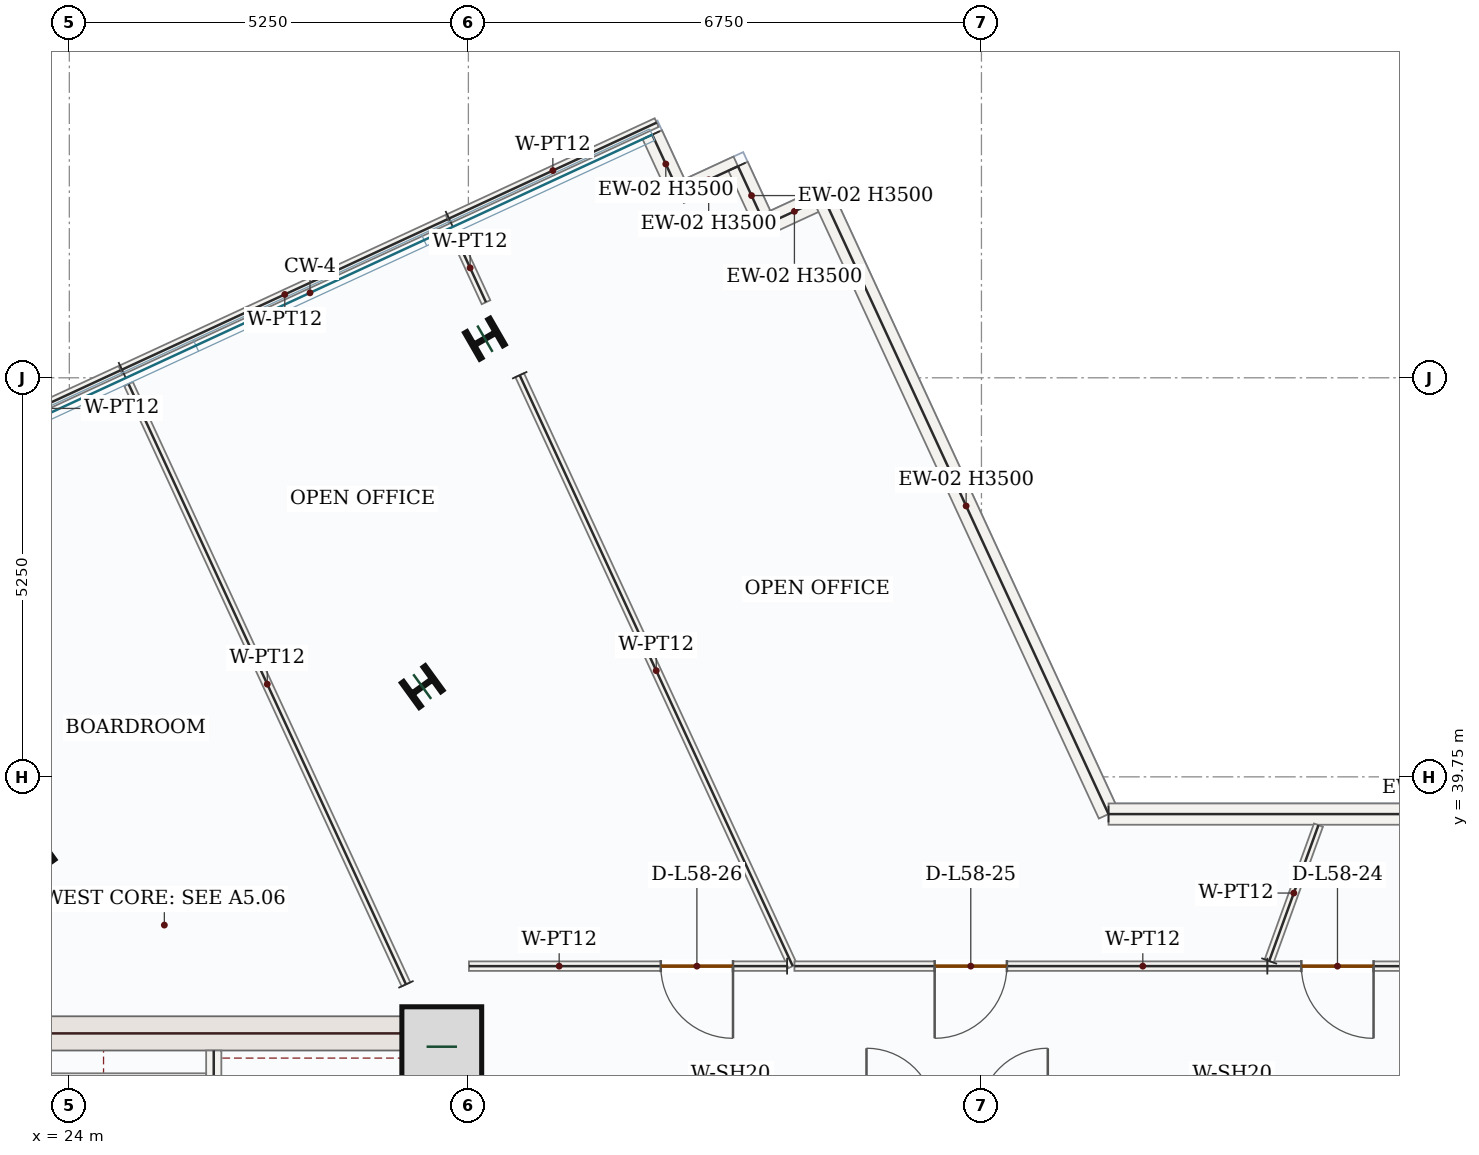
"""IFC4 building model, lengths in metres.
Left out: names, types, materials, properties, quantities, classifications, styles, units other than length and angle.
Written with IfcOpenShell. Run it as: python <this file> out.ifc"""

import sys

from ifc_helpers import new_model, si_unit, direction, frame, frame_2d, origin, origin_2d, place, context, subcontext, project, spatial, rectangle, i_section, extrude, source, transform, mapped, element, fill, save


model = new_model("IFC4")
c1 = context("Model", 3, precision=1e-05, world=origin(), true_north=direction((0.0, 1.0)))
c2 = subcontext(c1, "Body", "Model", "MODEL_VIEW")
j1 = project(units=[si_unit("LENGTHUNIT", "METRE"), si_unit("PLANEANGLEUNIT", "RADIAN")], contexts=[c1])
p1 = place(None, origin())
s1 = spatial("IfcSite", under=j1, at=p1, CompositionType="ELEMENT")
p2 = place(p1, origin())
s2 = spatial("IfcBuilding", under=s1, at=p2, CompositionType="ELEMENT")
p3 = place(p2, frame((0.0, 0.0, 246.6)))
s3 = spatial("IfcBuildingStorey", under=s2, at=p3, CompositionType="ELEMENT", Elevation=246.6)
p4 = place(p3, frame((29.025, 28.05, 0.0), z_axis=(0.0, 0.0, 1.0), x_axis=(0.0, 1.0, 0.0)))
e1 = element("IfcWall", 1, at=p4, inside=s3, PredefinedType="SHEAR", context=c2, shape_type="SweptSolid", body=[
    extrude(rectangle(XDim=8.55, YDim=0.45, at=frame_2d((4.275, 0.0))), origin(), (0.0, 0.0, 1.0), 3.5),
])
p5 = place(p4, frame((1.5, 0.0, 0.0)))
e2 = element("IfcOpeningElement", 2, at=p5, cuts=e1, PredefinedType="OPENING", context=c2, shape_type="SweptSolid", body=[
    extrude(rectangle(XDim=1.1, YDim=2.2, at=frame_2d((0.55, 1.1))), frame((0.0, 0.235, 0.0), z_axis=(0.0, -1.0, 0.0), x_axis=(1.0, 0.0, 0.0)), (0.0, 0.0, 1.0), 0.47),
])
m1 = source(origin(), c2, "Body", "SweptSolid", [
    extrude(rectangle(XDim=7.1, YDim=0.45, at=frame_2d((3.55, 0.0))), origin(), (0.0, 0.0, 1.0), 3.5),
])
p6 = place(p3, frame((21.7, 36.375, 0.0), z_axis=(0.0, 0.0, 1.0), x_axis=(1.0, 0.0, 0.0)))
e3 = element("IfcWall", 3, at=p6, inside=s3, PredefinedType="SHEAR", context=c2, shape_type="MappedRepresentation", body=[
    mapped(m1, transform((0.0, 0.0, 0.0), x_axis=(1.0, 0.0, 0.0), y_axis=(0.0, 1.0, 0.0), z_axis=(0.0, 0.0, 1.0), scale=1.0)),
])
m2 = source(origin(), c2, "Body", "SweptSolid", [
    extrude(rectangle(XDim=1.05, YDim=1.05, at=origin_2d()), origin(), (0.0, 0.0, 1.0), 3.75),
])
p7 = place(p3, frame((28.9, 36.2, 0.0), z_axis=(0.0, 0.0, 1.0), x_axis=(1.0, 0.0, 0.0)))
e4 = element("IfcColumn", 4, at=p7, inside=s3, PredefinedType="COLUMN", context=c2, shape_type="MappedRepresentation", body=[
    mapped(m2, transform((0.0, 0.0, 0.0), x_axis=(1.0, 0.0, 0.0), y_axis=(0.0, 1.0, 0.0), z_axis=(0.0, 0.0, 1.0), scale=1.0)),
])
m3 = source(origin(), c2, "Body", "SweptSolid", [
    extrude(i_section(OverallWidth=0.399, OverallDepth=0.386, WebThickness=0.021, FlangeThickness=0.033, FilletRadius=0.018, at=origin_2d()), origin(), (0.0, 0.0, 1.0), 3.75),
])
for number, where, z_axis, x_axis in (
    (5, (28.643, 40.937, 0.0), (0.0, 0.0, 1.0), (-0.588, 0.809, 0.0)),
    (6, (23.536, 38.711, 0.0), (0.0, 0.0, 1.0), (-0.588, 0.809, 0.0)),
    (7, (29.468, 45.514, 0.0), (0.0, 0.0, 1.0), (-0.5, 0.866, 0.0)),
):
    element("IfcColumn", number, at=place(p3, frame(where, z_axis=z_axis, x_axis=x_axis)), inside=s3, PredefinedType="COLUMN", context=c2, shape_type="MappedRepresentation", body=[
        mapped(m3, transform((0.0, 0.0, 0.0), x_axis=(1.0, 0.0, 0.0), y_axis=(0.0, 1.0, 0.0), z_axis=(0.0, 0.0, 1.0), scale=1.0)),
    ])
m4 = source(origin(), c2, "Body", "SweptSolid", [
    extrude(rectangle(XDim=0.85, YDim=0.28, at=frame_2d((0.425, 0.0))), origin(), (0.0, 0.0, 1.0), 3.5),
])
p8 = place(p3, frame((31.669, 48.198, 0.0), z_axis=(0.0, 0.0, 1.0), x_axis=(0.419422493365, -0.907791150023, 0.0)))
e8 = element("IfcWall", 8, at=p8, inside=s3, PredefinedType="SOLIDWALL", context=c2, shape_type="MappedRepresentation", body=[
    mapped(m4, transform((0.0, 0.0, 0.0), x_axis=(1.0, 0.0, 0.0), y_axis=(0.0, 1.0, 0.0), z_axis=(0.0, 0.0, 1.0), scale=1.0)),
])
m5 = source(origin(), c2, "Body", "SweptSolid", [
    extrude(rectangle(XDim=0.85, YDim=0.28, at=frame_2d((0.425, 0.0))), origin(), (0.0, 0.0, 1.0), 3.5),
])
p9 = place(p3, frame((32.025, 47.427, 0.0), z_axis=(0.0, 0.0, 1.0), x_axis=(0.907841666427, 0.419313139191, 0.0)))
e9 = element("IfcWall", 9, at=p9, inside=s3, PredefinedType="SOLIDWALL", context=c2, shape_type="MappedRepresentation", body=[
    mapped(m5, transform((0.0, 0.0, 0.0), x_axis=(1.0, 0.0, 0.0), y_axis=(0.0, 1.0, 0.0), z_axis=(0.0, 0.0, 1.0), scale=1.0)),
])
p10 = place(p3, frame((32.797, 47.783, 0.0), z_axis=(0.0, 0.0, 1.0), x_axis=(0.419422493365, -0.907791150023, 0.0)))
e10 = element("IfcWall", 10, at=p10, inside=s3, PredefinedType="SOLIDWALL", context=c2, shape_type="MappedRepresentation", body=[
    mapped(m4, transform((0.0, 0.0, 0.0), x_axis=(1.0, 0.0, 0.0), y_axis=(0.0, 1.0, 0.0), z_axis=(0.0, 0.0, 1.0), scale=1.0)),
])
p11 = place(p3, frame((33.154, 47.012, 0.0), z_axis=(0.0, 0.0, 1.0), x_axis=(0.907841666427, 0.419313139191, 0.0)))
e11 = element("IfcWall", 11, at=p11, inside=s3, PredefinedType="SOLIDWALL", context=c2, shape_type="MappedRepresentation", body=[
    mapped(m5, transform((0.0, 0.0, 0.0), x_axis=(1.0, 0.0, 0.0), y_axis=(0.0, 1.0, 0.0), z_axis=(0.0, 0.0, 1.0), scale=1.0)),
])
m6 = source(origin(), c2, "Body", "SweptSolid", [
    extrude(rectangle(XDim=8.932, YDim=0.28, at=frame_2d((4.466, 0.0))), origin(), (0.0, 0.0, 1.0), 3.5),
])
p12 = place(p3, frame((33.925, 47.368, 0.0), z_axis=(0.0, 0.0, 1.0), x_axis=(0.419437747849, -0.90778410191, 0.0)))
e12 = element("IfcWall", 12, at=p12, inside=s3, PredefinedType="SOLIDWALL", context=c2, shape_type="MappedRepresentation", body=[
    mapped(m6, transform((0.0, 0.0, 0.0), x_axis=(1.0, 0.0, 0.0), y_axis=(0.0, 1.0, 0.0), z_axis=(0.0, 0.0, 1.0), scale=1.0)),
])
m7 = source(origin(), c2, "Body", "SweptSolid", [
    extrude(rectangle(XDim=8.984, YDim=0.28, at=frame_2d((4.492, 0.0))), origin(), (0.0, 0.0, 1.0), 2.772),
])
p13 = place(p3, frame((37.672, 39.26, 0.0), z_axis=(0.0, 0.0, 1.0), x_axis=(1.0, 0.0, 0.0)))
e13 = element("IfcWall", 13, at=p13, inside=s3, PredefinedType="SOLIDWALL", context=c2, shape_type="MappedRepresentation", body=[
    mapped(m7, transform((0.0, 0.0, 0.0), x_axis=(1.0, 0.0, 0.0), y_axis=(0.0, 1.0, 0.0), z_axis=(0.0, 0.0, 1.0), scale=1.0)),
])
p14 = place(p3, frame((25.9, 28.15, 0.0), z_axis=(0.0, 0.0, 1.0), x_axis=(0.0, 1.0, 0.0)))
e14 = element("IfcWall", 14, at=p14, inside=s3, PredefinedType="SOLIDWALL", context=c2, shape_type="SweptSolid", body=[
    extrude(rectangle(XDim=8.0, YDim=0.2, at=frame_2d((4.0, 0.0))), origin(), (0.0, 0.0, 1.0), 3.5),
])
p15 = place(p14, frame((0.4, 0.0, 0.0)))
e15 = element("IfcOpeningElement", 15, at=p15, cuts=e14, PredefinedType="OPENING", context=c2, shape_type="SweptSolid", body=[
    extrude(rectangle(XDim=1.05, YDim=2.15, at=frame_2d((0.525, 1.075))), frame((0.0, 0.11, 0.0), z_axis=(0.0, -1.0, 0.0), x_axis=(1.0, 0.0, 0.0)), (0.0, 0.0, 1.0), 0.22),
])
m8 = source(origin(), c2, "Body", "SweptSolid", [
    extrude(rectangle(XDim=3.25, YDim=0.2, at=frame_2d((1.625, 0.0))), origin(), (0.0, 0.0, 1.0), 3.5),
])
p16 = place(p3, frame((22.55, 35.75, 0.0), z_axis=(0.0, 0.0, 1.0), x_axis=(1.0, 0.0, 0.0)))
e16 = element("IfcWall", 16, at=p16, inside=s3, PredefinedType="SOLIDWALL", context=c2, shape_type="MappedRepresentation", body=[
    mapped(m8, transform((0.0, 0.0, 0.0), x_axis=(1.0, 0.0, 0.0), y_axis=(0.0, 1.0, 0.0), z_axis=(0.0, 0.0, 1.0), scale=1.0)),
])
p17 = place(p3, frame((42.747, 37.259, 0.0), z_axis=(0.0, 0.0, 1.0), x_axis=(-0.999999916415, 0.000408864141, 0.0)))
e17 = element("IfcWall", 17, at=p17, inside=s3, PredefinedType="PARTITIONING", context=c2, shape_type="SweptSolid", body=[
    extrude(rectangle(XDim=2.986, YDim=0.125, at=frame_2d((1.493, 0.0))), origin(), (0.0, 0.0, 1.0), 3.5),
])
p18 = place(p17, frame((1.588, 0.0, 0.0)))
e18 = element("IfcOpeningElement", 18, at=p18, cuts=e17, PredefinedType="OPENING", context=c2, shape_type="SweptSolid", body=[
    extrude(rectangle(XDim=0.95, YDim=2.15, at=frame_2d((0.475, 1.075))), frame((0.0, 0.073, 0.0), z_axis=(0.0, -1.0, 0.0), x_axis=(1.0, 0.0, 0.0)), (0.0, 0.0, 1.0), 0.145),
])
m9 = source(origin(), c2, "Body", "SweptSolid", [
    extrude(rectangle(XDim=1.901, YDim=0.125, at=frame_2d((0.951, 0.0))), origin(), (0.0, 0.0, 1.0), 3.5),
])
p19 = place(p3, frame((39.785, 37.327, 0.0), z_axis=(0.0, 0.0, 1.0), x_axis=(0.340887270823, 0.940104179648, 0.0)))
e19 = element("IfcWall", 19, at=p19, inside=s3, PredefinedType="PARTITIONING", context=c2, shape_type="MappedRepresentation", body=[
    mapped(m9, transform((0.0, 0.0, 0.0), x_axis=(1.0, 0.0, 0.0), y_axis=(0.0, 1.0, 0.0), z_axis=(0.0, 0.0, 1.0), scale=1.0)),
])
m10 = source(origin(), c2, "Body", "SweptSolid", [
    extrude(rectangle(XDim=8.564, YDim=0.125, at=frame_2d((4.282, 0.0))), origin(), (0.0, 0.0, 1.0), 3.5),
])
p20 = place(p3, frame((29.925, 45.034, 0.0), z_axis=(0.0, 0.0, 1.0), x_axis=(0.419463084945, -0.907772394584, 0.0)))
e20 = element("IfcWall", 20, at=p20, inside=s3, PredefinedType="PARTITIONING", context=c2, shape_type="MappedRepresentation", body=[
    mapped(m10, transform((0.0, 0.0, 0.0), x_axis=(1.0, 0.0, 0.0), y_axis=(0.0, 1.0, 0.0), z_axis=(0.0, 0.0, 1.0), scale=1.0)),
])
p21 = place(p3, frame((33.443, 37.26, 0.0), z_axis=(0.0, 0.0, 1.0), x_axis=(-0.999999998299, -5.8329445e-05, 0.0)))
e21 = element("IfcWall", 21, at=p21, inside=s3, PredefinedType="PARTITIONING", context=c2, shape_type="SweptSolid", body=[
    extrude(rectangle(XDim=4.186, YDim=0.125, at=frame_2d((2.093, 0.0))), origin(), (0.0, 0.0, 1.0), 3.5),
])
p22 = place(p21, frame((0.712, 0.0, 0.0)))
e22 = element("IfcOpeningElement", 22, at=p22, cuts=e21, PredefinedType="OPENING", context=c2, shape_type="SweptSolid", body=[
    extrude(rectangle(XDim=0.95, YDim=2.15, at=frame_2d((0.475, 1.075))), frame((0.0, 0.073, 0.0), z_axis=(0.0, -1.0, 0.0), x_axis=(1.0, 0.0, 0.0)), (0.0, 0.0, 1.0), 0.145),
])
m11 = source(origin(), c2, "Body", "SweptSolid", [
    extrude(rectangle(XDim=8.701, YDim=0.125, at=frame_2d((4.351, 0.0))), origin(), (0.0, 0.0, 1.0), 3.5),
])
p23 = place(p3, frame((28.429, 37.02, 0.0), z_axis=(0.0, 0.0, 1.0), x_axis=(-0.419458495046, 0.907774515468, 0.0)))
e23 = element("IfcWall", 23, at=p23, inside=s3, PredefinedType="PARTITIONING", context=c2, shape_type="MappedRepresentation", body=[
    mapped(m11, transform((0.0, 0.0, 0.0), x_axis=(1.0, 0.0, 0.0), y_axis=(0.0, 1.0, 0.0), z_axis=(0.0, 0.0, 1.0), scale=1.0)),
])
m12 = source(origin(), c2, "Body", "SweptSolid", [
    extrude(rectangle(XDim=4.72, YDim=0.125, at=frame_2d((2.36, 0.0))), origin(), (0.0, 0.0, 1.0), 3.5),
])
p24 = place(p3, frame((24.692, 45.107, 0.0), z_axis=(0.0, 0.0, 1.0), x_axis=(0.907753377062, 0.419504238873, 0.0)))
e24 = element("IfcWall", 24, at=p24, inside=s3, PredefinedType="PARTITIONING", context=c2, shape_type="MappedRepresentation", body=[
    mapped(m12, transform((0.0, 0.0, 0.0), x_axis=(1.0, 0.0, 0.0), y_axis=(0.0, 1.0, 0.0), z_axis=(0.0, 0.0, 1.0), scale=1.0)),
])
m13 = source(origin(), c2, "Body", "SweptSolid", [
    extrude(rectangle(XDim=0.996, YDim=0.125, at=frame_2d((0.498, 0.0))), origin(), (0.0, 0.0, 1.0), 3.5),
])
p25 = place(p3, frame((29.064, 46.898, 0.0), z_axis=(0.0, 0.0, 1.0), x_axis=(0.419540149112, -0.907736780836, 0.0)))
e25 = element("IfcWall", 25, at=p25, inside=s3, PredefinedType="PARTITIONING", context=c2, shape_type="MappedRepresentation", body=[
    mapped(m13, transform((0.0, 0.0, 0.0), x_axis=(1.0, 0.0, 0.0), y_axis=(0.0, 1.0, 0.0), z_axis=(0.0, 0.0, 1.0), scale=1.0)),
])
m14 = source(origin(), c2, "Body", "SweptSolid", [
    extrude(rectangle(XDim=2.39, YDim=0.125, at=frame_2d((1.195, 0.0))), origin(), (0.0, 0.0, 1.0), 3.5),
])
p26 = place(p3, frame((22.505, 44.096, 0.0), z_axis=(0.0, 0.0, 1.0), x_axis=(0.907773916688, 0.419459790898, 0.0)))
e26 = element("IfcWall", 26, at=p26, inside=s3, PredefinedType="PARTITIONING", context=c2, shape_type="MappedRepresentation", body=[
    mapped(m14, transform((0.0, 0.0, 0.0), x_axis=(1.0, 0.0, 0.0), y_axis=(0.0, 1.0, 0.0), z_axis=(0.0, 0.0, 1.0), scale=1.0)),
])
m15 = source(origin(), c2, "Body", "SweptSolid", [
    extrude(rectangle(XDim=3.01, YDim=0.125, at=frame_2d((1.505, 0.0))), origin(), (0.0, 0.0, 1.0), 3.5),
])
p27 = place(p3, frame((28.995, 47.095, 0.0), z_axis=(0.0, 0.0, 1.0), x_axis=(0.907790759102, 0.419423339467, 0.0)))
e27 = element("IfcWall", 27, at=p27, inside=s3, PredefinedType="PARTITIONING", context=c2, shape_type="MappedRepresentation", body=[
    mapped(m15, transform((0.0, 0.0, 0.0), x_axis=(1.0, 0.0, 0.0), y_axis=(0.0, 1.0, 0.0), z_axis=(0.0, 0.0, 1.0), scale=1.0)),
])
p28 = place(p3, frame((39.761, 37.26, 0.0), z_axis=(0.0, 0.0, 1.0), x_axis=(-1.0, 0.0, 0.0)))
e28 = element("IfcWall", 28, at=p28, inside=s3, PredefinedType="PARTITIONING", context=c2, shape_type="SweptSolid", body=[
    extrude(rectangle(XDim=6.221, YDim=0.125, at=frame_2d((3.111, 0.0))), origin(), (0.0, 0.0, 1.0), 3.5),
])
p29 = place(p28, frame((3.427, 0.0, 0.0)))
e29 = element("IfcOpeningElement", 29, at=p29, cuts=e28, PredefinedType="OPENING", context=c2, shape_type="SweptSolid", body=[
    extrude(rectangle(XDim=0.95, YDim=2.15, at=frame_2d((0.475, 1.075))), frame((0.0, 0.073, 0.0), z_axis=(0.0, -1.0, 0.0), x_axis=(1.0, 0.0, 0.0)), (0.0, 0.0, 1.0), 0.145),
])
m16 = source(origin(), c2, "Body", "SweptSolid", [
    extrude(rectangle(XDim=0.95, YDim=2.15, at=frame_2d((0.475, 1.075))), frame((0.0, 0.025, 0.0), z_axis=(0.0, -1.0, 0.0), x_axis=(1.0, 0.0, 0.0)), (0.0, 0.0, 1.0), 0.05),
])
p30 = place(p18, origin())
e30 = element("IfcDoor", 30, at=p30, inside=s3, OperationType="SINGLE_SWING_LEFT", PredefinedType="DOOR", context=c2, shape_type="MappedRepresentation", body=[
    mapped(m16, transform((0.0, 0.0, 0.0), x_axis=(1.0, 0.0, 0.0), y_axis=(0.0, 1.0, 0.0), z_axis=(0.0, 0.0, 1.0), scale=1.0)),
])
fill(e18, e30)
p31 = place(p29, origin())
e31 = element("IfcDoor", 31, at=p31, inside=s3, OperationType="SINGLE_SWING_RIGHT", PredefinedType="DOOR", context=c2, shape_type="MappedRepresentation", body=[
    mapped(m16, transform((0.0, 0.0, 0.0), x_axis=(1.0, 0.0, 0.0), y_axis=(0.0, 1.0, 0.0), z_axis=(0.0, 0.0, 1.0), scale=1.0)),
])
fill(e29, e31)
p32 = place(p22, origin())
e32 = element("IfcDoor", 32, at=p32, inside=s3, OperationType="SINGLE_SWING_LEFT", PredefinedType="DOOR", context=c2, shape_type="MappedRepresentation", body=[
    mapped(m16, transform((0.0, 0.0, 0.0), x_axis=(1.0, 0.0, 0.0), y_axis=(0.0, 1.0, 0.0), z_axis=(0.0, 0.0, 1.0), scale=1.0)),
])
fill(e22, e32)
save(model, sys.argv[1])
